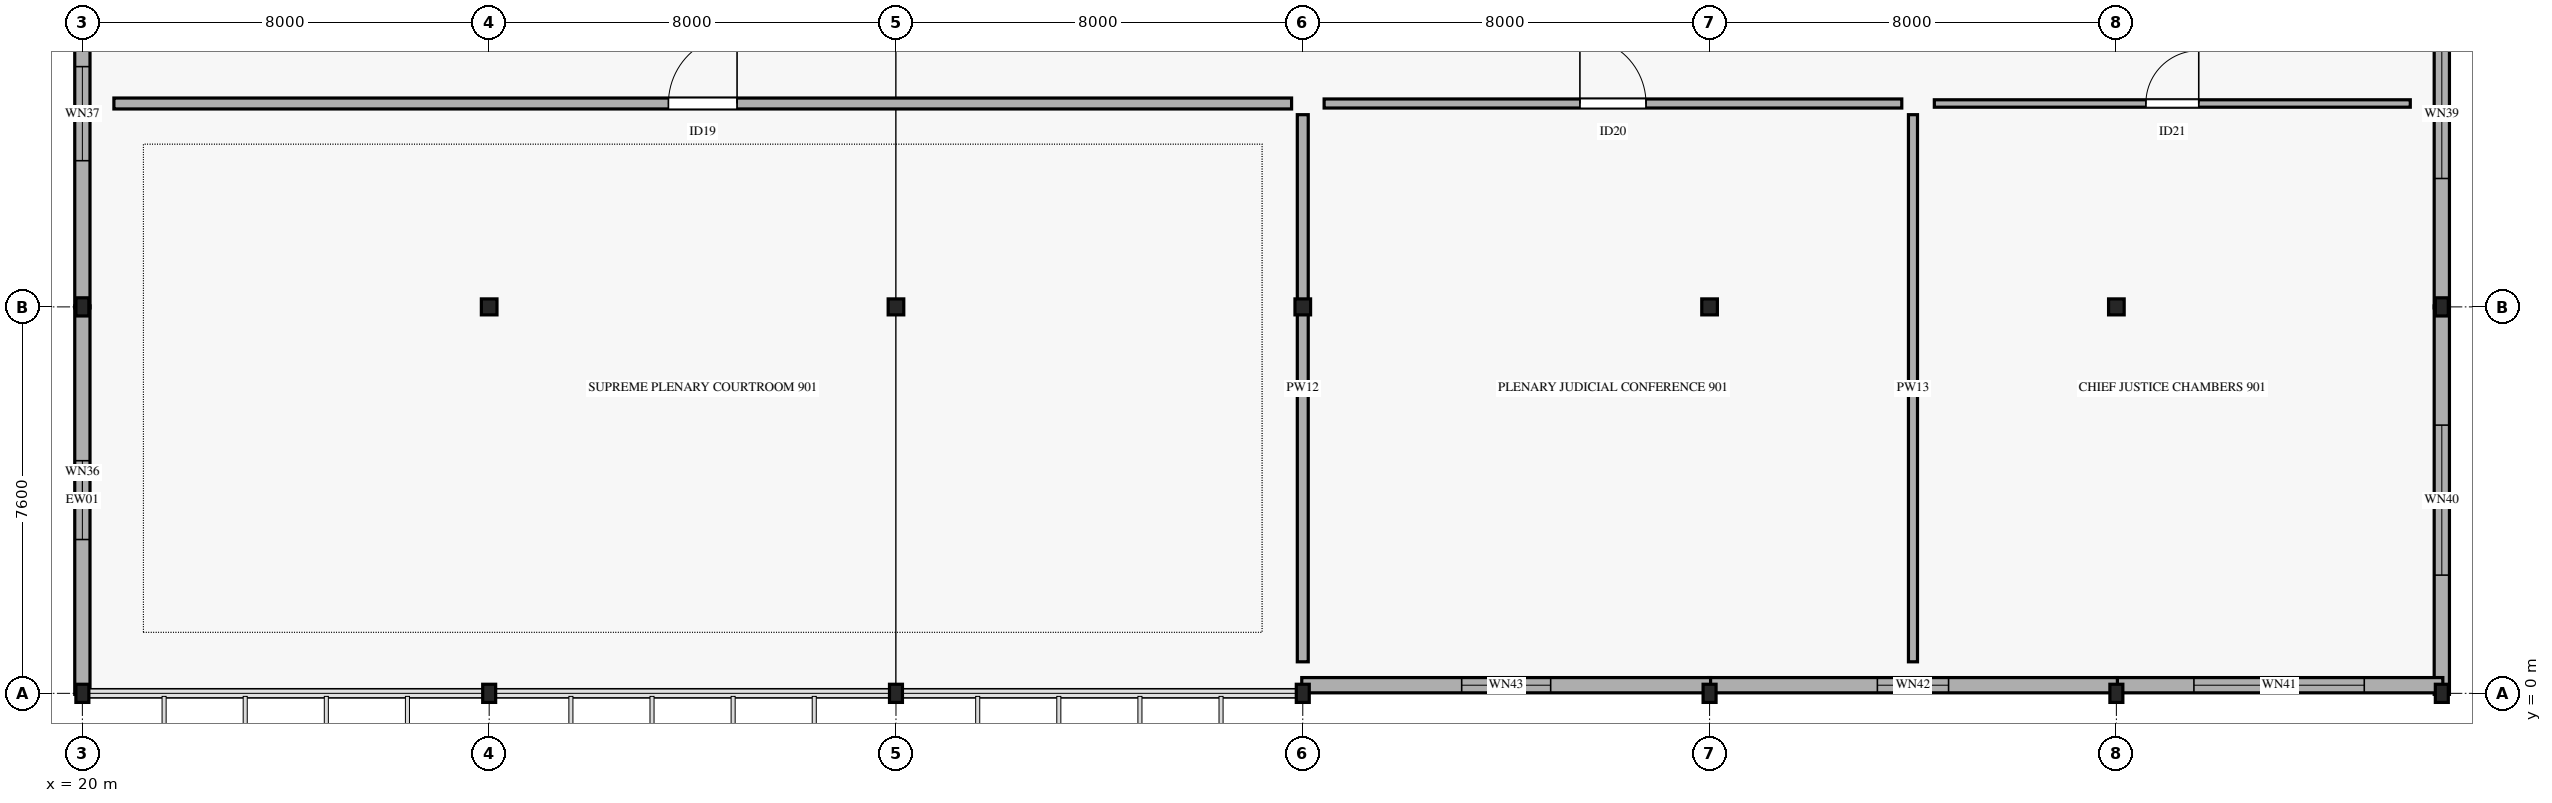
"""IFC4 building model, lengths in metres.
Left out: names, types, materials, properties, quantities, classifications, styles, units other than length and angle.
Written with IfcOpenShell. Run it as: python <this file> out.ifc"""

import sys

from ifc_helpers import new_model, si_unit, direction, frame, frame_2d, origin, origin_2d, place, context, subcontext, project, spatial, rectangle, i_section, extrude, element, fill, save


model = new_model("IFC4")
c1 = context("Model", 3, precision=1e-05, world=origin(), true_north=direction((0.0, 1.0)))
c2 = subcontext(c1, "Body", "Model", "MODEL_VIEW")
j1 = project(units=[si_unit("LENGTHUNIT", "METRE"), si_unit("PLANEANGLEUNIT", "RADIAN")], contexts=[c1])
p1 = place(None, origin())
s1 = spatial("IfcSite", under=j1, at=p1, CompositionType="ELEMENT")
p2 = place(p1, origin())
s2 = spatial("IfcBuilding", under=s1, at=p2, CompositionType="ELEMENT")
p3 = place(p2, frame((0.0, 0.0, 42.0)))
s3 = spatial("IfcBuildingStorey", under=s2, at=p3, CompositionType="ELEMENT", Elevation=42.0)
for number, where, z_axis, x_axis in (
    (1, (20.0, 0.0, 0.0), (0.0, 0.0, 1.0), (1.0, 0.0, 0.0)),
    (2, (20.0, 7.6, 0.0), (0.0, 0.0, 1.0), (1.0, 0.0, 0.0)),
    (3, (28.0, 0.0, 0.0), (0.0, 0.0, 1.0), (1.0, 0.0, 0.0)),
):
    element("IfcColumn", number, at=place(p3, frame(where, z_axis=z_axis, x_axis=x_axis)), inside=s3, PredefinedType="COLUMN", context=c2, shape_type="SweptSolid", body=[
        extrude(i_section(OverallWidth=0.255, OverallDepth=0.357, WebThickness=0.01, FlangeThickness=0.018, FilletRadius=0.015, at=origin_2d()), origin(), (0.0, 0.0, 1.0), 3.995),
    ])
p4 = place(p3, frame((28.0, 7.6, 0.0), z_axis=(0.0, 0.0, 1.0), x_axis=(1.0, 0.0, 0.0)))
e4 = element("IfcColumn", 4, at=p4, inside=s3, PredefinedType="COLUMN", context=c2, shape_type="SweptSolid", body=[
    extrude(i_section(OverallWidth=0.307, OverallDepth=0.314, WebThickness=0.012, FlangeThickness=0.019, FilletRadius=0.015, at=origin_2d()), origin(), (0.0, 0.0, 1.0), 3.995),
])
p5 = place(p3, frame((36.0, 0.0, 0.0), z_axis=(0.0, 0.0, 1.0), x_axis=(1.0, 0.0, 0.0)))
e5 = element("IfcColumn", 5, at=p5, inside=s3, PredefinedType="COLUMN", context=c2, shape_type="SweptSolid", body=[
    extrude(i_section(OverallWidth=0.255, OverallDepth=0.357, WebThickness=0.01, FlangeThickness=0.018, FilletRadius=0.015, at=origin_2d()), origin(), (0.0, 0.0, 1.0), 3.995),
])
p6 = place(p3, frame((36.0, 7.6, 0.0), z_axis=(0.0, 0.0, 1.0), x_axis=(1.0, 0.0, 0.0)))
e6 = element("IfcColumn", 6, at=p6, inside=s3, PredefinedType="COLUMN", context=c2, shape_type="SweptSolid", body=[
    extrude(i_section(OverallWidth=0.307, OverallDepth=0.314, WebThickness=0.012, FlangeThickness=0.019, FilletRadius=0.015, at=origin_2d()), origin(), (0.0, 0.0, 1.0), 3.995),
])
p7 = place(p3, frame((44.0, 0.0, 0.0), z_axis=(0.0, 0.0, 1.0), x_axis=(1.0, 0.0, 0.0)))
e7 = element("IfcColumn", 7, at=p7, inside=s3, PredefinedType="COLUMN", context=c2, shape_type="SweptSolid", body=[
    extrude(i_section(OverallWidth=0.255, OverallDepth=0.357, WebThickness=0.01, FlangeThickness=0.018, FilletRadius=0.015, at=origin_2d()), origin(), (0.0, 0.0, 1.0), 3.995),
])
p8 = place(p3, frame((44.0, 7.6, 0.0), z_axis=(0.0, 0.0, 1.0), x_axis=(1.0, 0.0, 0.0)))
e8 = element("IfcColumn", 8, at=p8, inside=s3, PredefinedType="COLUMN", context=c2, shape_type="SweptSolid", body=[
    extrude(i_section(OverallWidth=0.307, OverallDepth=0.314, WebThickness=0.012, FlangeThickness=0.019, FilletRadius=0.015, at=origin_2d()), origin(), (0.0, 0.0, 1.0), 3.995),
])
p9 = place(p3, frame((52.0, 0.0, 0.0), z_axis=(0.0, 0.0, 1.0), x_axis=(1.0, 0.0, 0.0)))
e9 = element("IfcColumn", 9, at=p9, inside=s3, PredefinedType="COLUMN", context=c2, shape_type="SweptSolid", body=[
    extrude(i_section(OverallWidth=0.255, OverallDepth=0.357, WebThickness=0.01, FlangeThickness=0.018, FilletRadius=0.015, at=origin_2d()), origin(), (0.0, 0.0, 1.0), 3.995),
])
p10 = place(p3, frame((52.0, 7.6, 0.0), z_axis=(0.0, 0.0, 1.0), x_axis=(1.0, 0.0, 0.0)))
e10 = element("IfcColumn", 10, at=p10, inside=s3, PredefinedType="COLUMN", context=c2, shape_type="SweptSolid", body=[
    extrude(i_section(OverallWidth=0.307, OverallDepth=0.314, WebThickness=0.012, FlangeThickness=0.019, FilletRadius=0.015, at=origin_2d()), origin(), (0.0, 0.0, 1.0), 3.995),
])
p11 = place(p3, frame((60.0, 0.0, 0.0), z_axis=(0.0, 0.0, 1.0), x_axis=(1.0, 0.0, 0.0)))
e11 = element("IfcColumn", 11, at=p11, inside=s3, PredefinedType="COLUMN", context=c2, shape_type="SweptSolid", body=[
    extrude(i_section(OverallWidth=0.255, OverallDepth=0.357, WebThickness=0.01, FlangeThickness=0.018, FilletRadius=0.015, at=origin_2d()), origin(), (0.0, 0.0, 1.0), 3.995),
])
p12 = place(p3, frame((60.0, 7.6, 0.0), z_axis=(0.0, 0.0, 1.0), x_axis=(1.0, 0.0, 0.0)))
e12 = element("IfcColumn", 12, at=p12, inside=s3, PredefinedType="COLUMN", context=c2, shape_type="SweptSolid", body=[
    extrude(i_section(OverallWidth=0.307, OverallDepth=0.314, WebThickness=0.012, FlangeThickness=0.019, FilletRadius=0.015, at=origin_2d()), origin(), (0.0, 0.0, 1.0), 3.995),
])
for number, where, z_axis, x_axis in (
    (13, (66.4, 0.0, 0.0), (0.0, 0.0, 1.0), (1.0, 0.0, 0.0)),
    (14, (66.4, 7.6, 0.0), (0.0, 0.0, 1.0), (1.0, 0.0, 0.0)),
):
    element("IfcColumn", number, at=place(p3, frame(where, z_axis=z_axis, x_axis=x_axis)), inside=s3, PredefinedType="COLUMN", context=c2, shape_type="SweptSolid", body=[
        extrude(i_section(OverallWidth=0.255, OverallDepth=0.357, WebThickness=0.01, FlangeThickness=0.018, FilletRadius=0.015, at=origin_2d()), origin(), (0.0, 0.0, 1.0), 3.995),
    ])
p13 = place(p3, frame((20.0, -0.02, 0.0), z_axis=(0.0, 0.0, 1.0), x_axis=(0.0, 1.0, 0.0)))
e15 = element("IfcWall", 15, at=p13, inside=s3, PredefinedType="STANDARD", context=c2, shape_type="SweptSolid", body=[
    extrude(rectangle(XDim=7.64, YDim=0.3, at=frame_2d((3.82, 0.0))), origin(), (0.0, 0.0, 1.0), 3.06),
])
p14 = place(p13, frame((3.045, 0.0, 0.75)))
e16 = element("IfcOpeningElement", 16, at=p14, cuts=e15, PredefinedType="OPENING", context=c2, shape_type="SweptSolid", body=[
    extrude(rectangle(XDim=1.55, YDim=1.9, at=frame_2d((0.775, 0.95))), frame((0.0, 0.16, 0.0), z_axis=(0.0, -1.0, 0.0), x_axis=(1.0, 0.0, 0.0)), (0.0, 0.0, 1.0), 0.32),
])
p15 = place(p3, frame((20.0, 7.58, 0.0), z_axis=(0.0, 0.0, 1.0), x_axis=(0.0, 1.0, 0.0)))
e17 = element("IfcWall", 17, at=p15, inside=s3, PredefinedType="STANDARD", context=c2, shape_type="SweptSolid", body=[
    extrude(rectangle(XDim=7.64, YDim=0.3, at=frame_2d((3.82, 0.0))), origin(), (0.0, 0.0, 1.0), 3.06),
])
p16 = place(p15, frame((2.895, 0.0, 0.75)))
e18 = element("IfcOpeningElement", 18, at=p16, cuts=e17, PredefinedType="OPENING", context=c2, shape_type="SweptSolid", body=[
    extrude(rectangle(XDim=1.85, YDim=1.9, at=frame_2d((0.925, 0.95))), frame((0.0, 0.16, 0.0), z_axis=(0.0, -1.0, 0.0), x_axis=(1.0, 0.0, 0.0)), (0.0, 0.0, 1.0), 0.32),
])
p17 = place(p3, frame((66.4, 15.22, 0.0), z_axis=(0.0, 0.0, 1.0), x_axis=(0.0, -1.0, 0.0)))
e19 = element("IfcWall", 19, at=p17, inside=s3, PredefinedType="STANDARD", context=c2, shape_type="SweptSolid", body=[
    extrude(rectangle(XDim=7.64, YDim=0.3, at=frame_2d((3.82, 0.0))), origin(), (0.0, 0.0, 1.0), 3.06),
])
p18 = place(p17, frame((2.545, 0.0, 0.75)))
e20 = element("IfcOpeningElement", 20, at=p18, cuts=e19, PredefinedType="OPENING", context=c2, shape_type="SweptSolid", body=[
    extrude(rectangle(XDim=2.55, YDim=1.9, at=frame_2d((1.275, 0.95))), frame((0.0, 0.16, 0.0), z_axis=(0.0, -1.0, 0.0), x_axis=(1.0, 0.0, 0.0)), (0.0, 0.0, 1.0), 0.32),
])
p19 = place(p3, frame((66.4, 7.62, 0.0), z_axis=(0.0, 0.0, 1.0), x_axis=(0.0, -1.0, 0.0)))
e21 = element("IfcWall", 21, at=p19, inside=s3, PredefinedType="STANDARD", context=c2, shape_type="SweptSolid", body=[
    extrude(rectangle(XDim=7.64, YDim=0.3, at=frame_2d((3.82, 0.0))), origin(), (0.0, 0.0, 1.0), 3.06),
])
p20 = place(p19, frame((2.345, 0.0, 0.75)))
e22 = element("IfcOpeningElement", 22, at=p20, cuts=e21, PredefinedType="OPENING", context=c2, shape_type="SweptSolid", body=[
    extrude(rectangle(XDim=2.95, YDim=1.9, at=frame_2d((1.475, 0.95))), frame((0.0, 0.16, 0.0), z_axis=(0.0, -1.0, 0.0), x_axis=(1.0, 0.0, 0.0)), (0.0, 0.0, 1.0), 0.32),
])
p21 = place(p3, frame((66.42, 0.16, 0.0), z_axis=(0.0, 0.0, 1.0), x_axis=(-1.0, 0.0, 0.0)))
e23 = element("IfcWall", 23, at=p21, inside=s3, PredefinedType="STANDARD", context=c2, shape_type="SweptSolid", body=[
    extrude(rectangle(XDim=6.44, YDim=0.3, at=frame_2d((3.22, 0.0))), origin(), (0.0, 0.0, 1.0), 3.06),
])
p22 = place(p21, frame((1.545, 0.0, 0.75)))
e24 = element("IfcOpeningElement", 24, at=p22, cuts=e23, PredefinedType="OPENING", context=c2, shape_type="SweptSolid", body=[
    extrude(rectangle(XDim=3.35, YDim=1.9, at=frame_2d((1.675, 0.95))), frame((0.0, 0.16, 0.0), z_axis=(0.0, -1.0, 0.0), x_axis=(1.0, 0.0, 0.0)), (0.0, 0.0, 1.0), 0.32),
])
p23 = place(p3, frame((60.02, 0.16, 0.0), z_axis=(0.0, 0.0, 1.0), x_axis=(-1.0, 0.0, 0.0)))
e25 = element("IfcWall", 25, at=p23, inside=s3, PredefinedType="STANDARD", context=c2, shape_type="SweptSolid", body=[
    extrude(rectangle(XDim=8.04, YDim=0.3, at=frame_2d((4.02, 0.0))), origin(), (0.0, 0.0, 1.0), 3.06),
])
p24 = place(p23, frame((3.32, 0.0, 0.75)))
e26 = element("IfcOpeningElement", 26, at=p24, cuts=e25, PredefinedType="OPENING", context=c2, shape_type="SweptSolid", body=[
    extrude(rectangle(XDim=1.4, YDim=1.65, at=frame_2d((0.7, 0.825))), frame((0.0, 0.16, 0.0), z_axis=(0.0, -1.0, 0.0), x_axis=(1.0, 0.0, 0.0)), (0.0, 0.0, 1.0), 0.32),
])
p25 = place(p3, frame((52.02, 0.16, 0.0), z_axis=(0.0, 0.0, 1.0), x_axis=(-1.0, 0.0, 0.0)))
e27 = element("IfcWall", 27, at=p25, inside=s3, PredefinedType="STANDARD", context=c2, shape_type="SweptSolid", body=[
    extrude(rectangle(XDim=8.04, YDim=0.3, at=frame_2d((4.02, 0.0))), origin(), (0.0, 0.0, 1.0), 3.06),
])
p26 = place(p25, frame((3.145, 0.0, 0.75)))
e28 = element("IfcOpeningElement", 28, at=p26, cuts=e27, PredefinedType="OPENING", context=c2, shape_type="SweptSolid", body=[
    extrude(rectangle(XDim=1.75, YDim=1.65, at=frame_2d((0.875, 0.825))), frame((0.0, 0.16, 0.0), z_axis=(0.0, -1.0, 0.0), x_axis=(1.0, 0.0, 0.0)), (0.0, 0.0, 1.0), 0.32),
])
p27 = place(p3, frame((20.62, 11.6, 0.0), z_axis=(0.0, 0.0, 1.0), x_axis=(1.0, 0.0, 0.0)))
e29 = element("IfcWall", 29, at=p27, inside=s3, PredefinedType="PARTITIONING", context=c2, shape_type="SweptSolid", body=[
    extrude(rectangle(XDim=23.16, YDim=0.215, at=frame_2d((11.58, 0.0))), origin(), (0.0, 0.0, 1.0), 2.85),
])
p28 = place(p27, frame((10.905, 0.0, 0.0)))
e30 = element("IfcOpeningElement", 30, at=p28, cuts=e29, PredefinedType="OPENING", context=c2, shape_type="SweptSolid", body=[
    extrude(rectangle(XDim=1.35, YDim=2.25, at=frame_2d((0.675, 1.125))), frame((0.0, 0.117, 0.0), z_axis=(0.0, -1.0, 0.0), x_axis=(1.0, 0.0, 0.0)), (0.0, 0.0, 1.0), 0.235),
])
p29 = place(p3, frame((44.0, 0.62, 0.0), z_axis=(0.0, 0.0, 1.0), x_axis=(0.0, 1.0, 0.0)))
e31 = element("IfcWall", 31, at=p29, inside=s3, PredefinedType="PARTITIONING", context=c2, shape_type="SweptSolid", body=[
    extrude(rectangle(XDim=10.76, YDim=0.215, at=frame_2d((5.38, 0.0))), origin(), (0.0, 0.0, 1.0), 2.85),
])
p30 = place(p3, frame((44.42, 11.6, 0.0), z_axis=(0.0, 0.0, 1.0), x_axis=(1.0, 0.0, 0.0)))
e32 = element("IfcWall", 32, at=p30, inside=s3, PredefinedType="PARTITIONING", context=c2, shape_type="SweptSolid", body=[
    extrude(rectangle(XDim=11.36, YDim=0.178, at=frame_2d((5.68, 0.0))), origin(), (0.0, 0.0, 1.0), 2.85),
])
p31 = place(p30, frame((5.03, 0.0, 0.0)))
e33 = element("IfcOpeningElement", 33, at=p31, cuts=e32, PredefinedType="OPENING", context=c2, shape_type="SweptSolid", body=[
    extrude(rectangle(XDim=1.3, YDim=2.2, at=frame_2d((0.65, 1.1))), frame((0.0, 0.099, 0.0), z_axis=(0.0, -1.0, 0.0), x_axis=(1.0, 0.0, 0.0)), (0.0, 0.0, 1.0), 0.198),
])
p32 = place(p3, frame((56.0, 0.62, 0.0), z_axis=(0.0, 0.0, 1.0), x_axis=(0.0, 1.0, 0.0)))
e34 = element("IfcWall", 34, at=p32, inside=s3, PredefinedType="PARTITIONING", context=c2, shape_type="SweptSolid", body=[
    extrude(rectangle(XDim=10.76, YDim=0.178, at=frame_2d((5.38, 0.0))), origin(), (0.0, 0.0, 1.0), 2.85),
])
p33 = place(p3, frame((56.42, 11.6, 0.0), z_axis=(0.0, 0.0, 1.0), x_axis=(1.0, 0.0, 0.0)))
e35 = element("IfcWall", 35, at=p33, inside=s3, PredefinedType="PARTITIONING", context=c2, shape_type="SweptSolid", body=[
    extrude(rectangle(XDim=9.36, YDim=0.146, at=frame_2d((4.68, 0.0))), origin(), (0.0, 0.0, 1.0), 2.85),
])
p34 = place(p33, frame((4.16, 0.0, 0.0)))
e36 = element("IfcOpeningElement", 36, at=p34, cuts=e35, PredefinedType="OPENING", context=c2, shape_type="SweptSolid", body=[
    extrude(rectangle(XDim=1.04, YDim=2.2, at=frame_2d((0.52, 1.1))), frame((0.0, 0.083, 0.0), z_axis=(0.0, -1.0, 0.0), x_axis=(1.0, 0.0, 0.0)), (0.0, 0.0, 1.0), 0.166),
])
p35 = place(p14, origin())
e37 = element("IfcWindow", 37, at=p35, inside=s3, PartitioningType="SINGLE_PANEL", PredefinedType="WINDOW", context=c2, shape_type="SweptSolid", body=[
    extrude(rectangle(XDim=1.55, YDim=1.9, at=frame_2d((0.775, 0.95))), frame((0.0, 0.03, 0.0), z_axis=(0.0, -1.0, 0.0), x_axis=(1.0, 0.0, 0.0)), (0.0, 0.0, 1.0), 0.06),
])
fill(e16, e37)
p36 = place(p16, origin())
e38 = element("IfcWindow", 38, at=p36, inside=s3, PartitioningType="SINGLE_PANEL", PredefinedType="WINDOW", context=c2, shape_type="SweptSolid", body=[
    extrude(rectangle(XDim=1.85, YDim=1.9, at=frame_2d((0.925, 0.95))), frame((0.0, 0.03, 0.0), z_axis=(0.0, -1.0, 0.0), x_axis=(1.0, 0.0, 0.0)), (0.0, 0.0, 1.0), 0.06),
])
fill(e18, e38)
p37 = place(p18, origin())
e39 = element("IfcWindow", 39, at=p37, inside=s3, PartitioningType="SINGLE_PANEL", PredefinedType="WINDOW", context=c2, shape_type="SweptSolid", body=[
    extrude(rectangle(XDim=2.55, YDim=1.9, at=frame_2d((1.275, 0.95))), frame((0.0, 0.03, 0.0), z_axis=(0.0, -1.0, 0.0), x_axis=(1.0, 0.0, 0.0)), (0.0, 0.0, 1.0), 0.06),
])
fill(e20, e39)
p38 = place(p20, origin())
e40 = element("IfcWindow", 40, at=p38, inside=s3, PartitioningType="SINGLE_PANEL", PredefinedType="WINDOW", context=c2, shape_type="SweptSolid", body=[
    extrude(rectangle(XDim=2.95, YDim=1.9, at=frame_2d((1.475, 0.95))), frame((0.0, 0.03, 0.0), z_axis=(0.0, -1.0, 0.0), x_axis=(1.0, 0.0, 0.0)), (0.0, 0.0, 1.0), 0.06),
])
fill(e22, e40)
p39 = place(p22, origin())
e41 = element("IfcWindow", 41, at=p39, inside=s3, PartitioningType="SINGLE_PANEL", PredefinedType="WINDOW", context=c2, shape_type="SweptSolid", body=[
    extrude(rectangle(XDim=3.35, YDim=1.9, at=frame_2d((1.675, 0.95))), frame((0.0, 0.03, 0.0), z_axis=(0.0, -1.0, 0.0), x_axis=(1.0, 0.0, 0.0)), (0.0, 0.0, 1.0), 0.06),
])
fill(e24, e41)
p40 = place(p24, origin())
e42 = element("IfcWindow", 42, at=p40, inside=s3, PartitioningType="SINGLE_PANEL", PredefinedType="WINDOW", context=c2, shape_type="SweptSolid", body=[
    extrude(rectangle(XDim=1.4, YDim=1.65, at=frame_2d((0.7, 0.825))), frame((0.0, 0.03, 0.0), z_axis=(0.0, -1.0, 0.0), x_axis=(1.0, 0.0, 0.0)), (0.0, 0.0, 1.0), 0.06),
])
fill(e26, e42)
p41 = place(p26, origin())
e43 = element("IfcWindow", 43, at=p41, inside=s3, PartitioningType="SINGLE_PANEL", PredefinedType="WINDOW", context=c2, shape_type="SweptSolid", body=[
    extrude(rectangle(XDim=1.75, YDim=1.65, at=frame_2d((0.875, 0.825))), frame((0.0, 0.03, 0.0), z_axis=(0.0, -1.0, 0.0), x_axis=(1.0, 0.0, 0.0)), (0.0, 0.0, 1.0), 0.06),
])
fill(e28, e43)
p42 = place(p28, origin())
e44 = element("IfcDoor", 44, at=p42, inside=s3, OperationType="SINGLE_SWING_RIGHT", PredefinedType="DOOR", context=c2, shape_type="SweptSolid", body=[
    extrude(rectangle(XDim=1.35, YDim=2.25, at=frame_2d((0.675, 1.125))), frame((0.0, 0.025, 0.0), z_axis=(0.0, -1.0, 0.0), x_axis=(1.0, 0.0, 0.0)), (0.0, 0.0, 1.0), 0.05),
])
fill(e30, e44)
p43 = place(p31, origin())
e45 = element("IfcDoor", 45, at=p43, inside=s3, OperationType="SINGLE_SWING_LEFT", PredefinedType="DOOR", context=c2, shape_type="SweptSolid", body=[
    extrude(rectangle(XDim=1.3, YDim=2.2, at=frame_2d((0.65, 1.1))), frame((0.0, 0.025, 0.0), z_axis=(0.0, -1.0, 0.0), x_axis=(1.0, 0.0, 0.0)), (0.0, 0.0, 1.0), 0.05),
])
fill(e33, e45)
p44 = place(p34, origin())
e46 = element("IfcDoor", 46, at=p44, inside=s3, OperationType="SINGLE_SWING_RIGHT", PredefinedType="DOOR", context=c2, shape_type="SweptSolid", body=[
    extrude(rectangle(XDim=1.04, YDim=2.2, at=frame_2d((0.52, 1.1))), frame((0.0, 0.025, 0.0), z_axis=(0.0, -1.0, 0.0), x_axis=(1.0, 0.0, 0.0)), (0.0, 0.0, 1.0), 0.05),
])
fill(e36, e46)
save(model, sys.argv[1])
